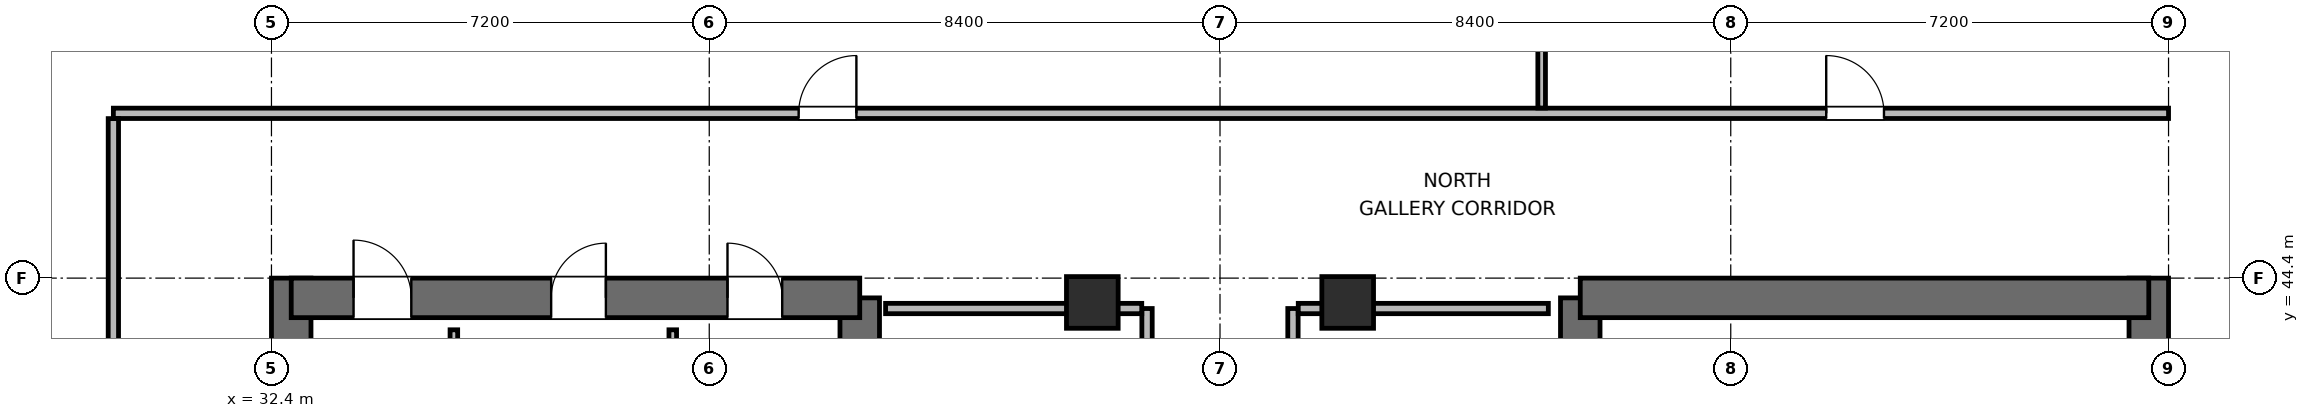
"""IFC4 building model, lengths in metres.
Left out: names, types, materials, properties, quantities, classifications, styles, units other than length and angle.
Written with IfcOpenShell. Run it as: python <this file> out.ifc"""

import sys

from ifc_helpers import new_model, si_unit, direction, frame, frame_2d, origin, origin_2d, place, context, subcontext, project, spatial, rectangle, extrude, element, fill, save


model = new_model("IFC4")
c1 = context("Model", 3, precision=1e-05, world=origin(), true_north=direction((0.0, 1.0)))
c2 = subcontext(c1, "Body", "Model", "MODEL_VIEW")
j1 = project(units=[si_unit("LENGTHUNIT", "METRE"), si_unit("PLANEANGLEUNIT", "RADIAN")], contexts=[c1])
p1 = place(None, origin())
s1 = spatial("IfcSite", under=j1, at=p1, CompositionType="ELEMENT")
p2 = place(p1, origin())
s2 = spatial("IfcBuilding", under=s1, at=p2, CompositionType="ELEMENT")
p3 = place(p2, frame((0.0, 0.0, 214.8)))
s3 = spatial("IfcBuildingStorey", under=s2, at=p3, CompositionType="ELEMENT", Elevation=214.8)
p4 = place(p3, frame((32.725, 27.6, 0.0), z_axis=(0.0, 0.0, 1.0), x_axis=(0.0, 1.0, 0.0)))
e1 = element("IfcWall", 1, at=p4, inside=s3, PredefinedType="SHEAR", context=c2, shape_type="SweptSolid", body=[
    extrude(rectangle(XDim=16.8, YDim=0.65, at=frame_2d((8.4, 0.0))), origin(), (0.0, 0.0, 1.0), 4.5),
])
p5 = place(p3, frame((42.075, 37.8, 0.0), z_axis=(0.0, 0.0, 1.0), x_axis=(0.0, 1.0, 0.0)))
e2 = element("IfcWall", 2, at=p5, inside=s3, PredefinedType="SHEAR", context=c2, shape_type="SweptSolid", body=[
    extrude(rectangle(XDim=6.275, YDim=0.65, at=frame_2d((3.137, 0.0))), origin(), (0.0, 0.0, 1.0), 4.5),
])
p6 = place(p3, frame((32.725, 44.075, 0.0), z_axis=(0.0, 0.0, 1.0), x_axis=(1.0, 0.0, 0.0)))
e3 = element("IfcWall", 3, at=p6, inside=s3, PredefinedType="SHEAR", context=c2, shape_type="SweptSolid", body=[
    extrude(rectangle(XDim=9.35, YDim=0.65, at=frame_2d((4.675, 0.0))), origin(), (0.0, 0.0, 1.0), 4.5),
])
p7 = place(p6, frame((1.025, 0.0, 0.0)))
e4 = element("IfcOpeningElement", 4, at=p7, cuts=e3, PredefinedType="OPENING", context=c2, shape_type="SweptSolid", body=[
    extrude(rectangle(XDim=0.95, YDim=2.04, at=frame_2d((0.475, 1.02))), frame((0.0, 0.335, 0.0), z_axis=(0.0, -1.0, 0.0), x_axis=(1.0, 0.0, 0.0)), (0.0, 0.0, 1.0), 0.67),
])
p8 = place(p6, frame((4.275, 0.0, 0.0)))
e5 = element("IfcOpeningElement", 5, at=p8, cuts=e3, PredefinedType="OPENING", context=c2, shape_type="SweptSolid", body=[
    extrude(rectangle(XDim=0.9, YDim=2.02, at=frame_2d((0.45, 1.01))), frame((0.0, 0.335, 0.0), z_axis=(0.0, -1.0, 0.0), x_axis=(1.0, 0.0, 0.0)), (0.0, 0.0, 1.0), 0.67),
])
p9 = place(p6, frame((7.175, 0.0, 0.0)))
e6 = element("IfcOpeningElement", 6, at=p9, cuts=e3, PredefinedType="OPENING", context=c2, shape_type="SweptSolid", body=[
    extrude(rectangle(XDim=0.9, YDim=2.02, at=frame_2d((0.45, 1.01))), frame((0.0, 0.335, 0.0), z_axis=(0.0, -1.0, 0.0), x_axis=(1.0, 0.0, 0.0)), (0.0, 0.0, 1.0), 0.67),
])
p10 = place(p3, frame((53.925, 38.0, 0.0), z_axis=(0.0, 0.0, 1.0), x_axis=(0.0, 1.0, 0.0)))
e7 = element("IfcWall", 7, at=p10, inside=s3, PredefinedType="SHEAR", context=c2, shape_type="SweptSolid", body=[
    extrude(rectangle(XDim=6.075, YDim=0.65, at=frame_2d((3.038, 0.0))), origin(), (0.0, 0.0, 1.0), 4.5),
])
p11 = place(p3, frame((63.275, 27.6, 0.0), z_axis=(0.0, 0.0, 1.0), x_axis=(0.0, 1.0, 0.0)))
e8 = element("IfcWall", 8, at=p11, inside=s3, PredefinedType="SHEAR", context=c2, shape_type="SweptSolid", body=[
    extrude(rectangle(XDim=16.8, YDim=0.65, at=frame_2d((8.4, 0.0))), origin(), (0.0, 0.0, 1.0), 4.5),
])
p12 = place(p3, frame((53.925, 44.075, 0.0), z_axis=(0.0, 0.0, 1.0), x_axis=(1.0, 0.0, 0.0)))
e9 = element("IfcWall", 9, at=p12, inside=s3, PredefinedType="SHEAR", context=c2, shape_type="SweptSolid", body=[
    extrude(rectangle(XDim=9.35, YDim=0.65, at=frame_2d((4.675, 0.0))), origin(), (0.0, 0.0, 1.0), 4.5),
])
for number, where, z_axis, x_axis in (
    (10, (45.9, 44.0, 0.0), (0.0, 0.0, 1.0), (1.0, 0.0, 0.0)),
    (11, (50.1, 44.0, 0.0), (0.0, 0.0, 1.0), (1.0, 0.0, 0.0)),
):
    element("IfcColumn", number, at=place(p3, frame(where, z_axis=z_axis, x_axis=x_axis)), inside=s3, PredefinedType="COLUMN", context=c2, shape_type="SweptSolid", body=[
        extrude(rectangle(XDim=0.85, YDim=0.85, at=origin_2d()), origin(), (0.0, 0.0, 1.0), 4.5),
    ])
for number, where, z_axis, x_axis in (
    (12, (35.4, 41.095, 0.0), (0.0, 0.0, 1.0), (0.0, 1.0, 0.0)),
    (13, (39.0, 41.095, 0.0), (0.0, 0.0, 1.0), (0.0, 1.0, 0.0)),
):
    element("IfcWall", number, at=place(p3, frame(where, z_axis=z_axis, x_axis=x_axis)), inside=s3, PredefinedType="PARTITIONING", context=c2, shape_type="SweptSolid", body=[
        extrude(rectangle(XDim=2.455, YDim=0.125, at=frame_2d((1.228, 0.0))), origin(), (0.0, 0.0, 1.0), 4.28),
    ])
p13 = place(p3, frame((46.8, 37.9, 0.0), z_axis=(0.0, 0.0, 1.0), x_axis=(0.0, 1.0, 0.0)))
e14 = element("IfcWall", 14, at=p13, inside=s3, PredefinedType="PARTITIONING", context=c2, shape_type="SweptSolid", body=[
    extrude(rectangle(XDim=6.0, YDim=0.17, at=frame_2d((3.0, 0.0))), origin(), (0.0, 0.0, 1.0), 4.28),
])
p14 = place(p13, frame((1.47, 0.0, 0.0)))
e15 = element("IfcOpeningElement", 15, at=p14, cuts=e14, PredefinedType="OPENING", context=c2, shape_type="SweptSolid", body=[
    extrude(rectangle(XDim=0.9, YDim=2.02, at=frame_2d((0.45, 1.01))), frame((0.0, 0.095, 0.0), z_axis=(0.0, -1.0, 0.0), x_axis=(1.0, 0.0, 0.0)), (0.0, 0.0, 1.0), 0.19),
])
p15 = place(p13, frame((4.47, 0.0, 0.0)))
e16 = element("IfcOpeningElement", 16, at=p15, cuts=e14, PredefinedType="OPENING", context=c2, shape_type="SweptSolid", body=[
    extrude(rectangle(XDim=0.9, YDim=2.02, at=frame_2d((0.45, 1.01))), frame((0.0, 0.095, 0.0), z_axis=(0.0, -1.0, 0.0), x_axis=(1.0, 0.0, 0.0)), (0.0, 0.0, 1.0), 0.19),
])
p16 = place(p3, frame((42.5, 43.9, 0.0), z_axis=(0.0, 0.0, 1.0), x_axis=(1.0, 0.0, 0.0)))
e17 = element("IfcWall", 17, at=p16, inside=s3, PredefinedType="PARTITIONING", context=c2, shape_type="SweptSolid", body=[
    extrude(rectangle(XDim=4.213, YDim=0.17, at=frame_2d((2.106, 0.0))), origin(), (0.0, 0.0, 1.0), 3.365),
])
p17 = place(p3, frame((49.2, 37.9, 0.0), z_axis=(0.0, 0.0, 1.0), x_axis=(0.0, 1.0, 0.0)))
e18 = element("IfcWall", 18, at=p17, inside=s3, PredefinedType="PARTITIONING", context=c2, shape_type="SweptSolid", body=[
    extrude(rectangle(XDim=6.0, YDim=0.17, at=frame_2d((3.0, 0.0))), origin(), (0.0, 0.0, 1.0), 4.28),
])
p18 = place(p17, frame((2.55, 0.0, 0.0)))
e19 = element("IfcOpeningElement", 19, at=p18, cuts=e18, PredefinedType="OPENING", context=c2, shape_type="SweptSolid", body=[
    extrude(rectangle(XDim=0.9, YDim=2.02, at=frame_2d((0.45, 1.01))), frame((0.0, 0.095, 0.0), z_axis=(0.0, -1.0, 0.0), x_axis=(1.0, 0.0, 0.0)), (0.0, 0.0, 1.0), 0.19),
])
p19 = place(p3, frame((49.287, 43.9, 0.0), z_axis=(0.0, 0.0, 1.0), x_axis=(1.0, 0.0, 0.0)))
e20 = element("IfcWall", 20, at=p19, inside=s3, PredefinedType="PARTITIONING", context=c2, shape_type="SweptSolid", body=[
    extrude(rectangle(XDim=4.113, YDim=0.17, at=frame_2d((2.056, 0.0))), origin(), (0.0, 0.0, 1.0), 3.365),
])
p20 = place(p3, frame((29.8, 47.11, 0.0), z_axis=(0.0, 0.0, 1.0), x_axis=(1.0, 0.0, 0.0)))
e21 = element("IfcWall", 21, at=p20, inside=s3, PredefinedType="PARTITIONING", context=c2, shape_type="SweptSolid", body=[
    extrude(rectangle(XDim=33.8, YDim=0.17, at=frame_2d((16.9, 0.0))), origin(), (0.0, 0.0, 1.0), 4.28),
])
p21 = place(p20, frame((11.27, 0.0, 0.0)))
e22 = element("IfcOpeningElement", 22, at=p21, cuts=e21, PredefinedType="OPENING", context=c2, shape_type="SweptSolid", body=[
    extrude(rectangle(XDim=0.95, YDim=2.04, at=frame_2d((0.475, 1.02))), frame((0.0, 0.095, 0.0), z_axis=(0.0, -1.0, 0.0), x_axis=(1.0, 0.0, 0.0)), (0.0, 0.0, 1.0), 0.19),
])
p22 = place(p20, frame((28.17, 0.0, 0.0)))
e23 = element("IfcOpeningElement", 23, at=p22, cuts=e21, PredefinedType="OPENING", context=c2, shape_type="SweptSolid", body=[
    extrude(rectangle(XDim=0.95, YDim=2.04, at=frame_2d((0.475, 1.02))), frame((0.0, 0.095, 0.0), z_axis=(0.0, -1.0, 0.0), x_axis=(1.0, 0.0, 0.0)), (0.0, 0.0, 1.0), 0.19),
])
p23 = place(p3, frame((29.8, 24.977, 0.0), z_axis=(0.0, 0.0, 1.0), x_axis=(0.0, 1.0, 0.0)))
e24 = element("IfcWall", 24, at=p23, inside=s3, PredefinedType="PARTITIONING", context=c2, shape_type="SweptSolid", body=[
    extrude(rectangle(XDim=22.046, YDim=0.17, at=frame_2d((11.023, 0.0))), origin(), (0.0, 0.0, 1.0), 4.28),
])
p24 = place(p23, frame((4.593, 0.0, 0.0)))
e25 = element("IfcOpeningElement", 25, at=p24, cuts=e24, PredefinedType="OPENING", context=c2, shape_type="SweptSolid", body=[
    extrude(rectangle(XDim=0.95, YDim=2.04, at=frame_2d((0.475, 1.02))), frame((0.0, 0.095, 0.0), z_axis=(0.0, -1.0, 0.0), x_axis=(1.0, 0.0, 0.0)), (0.0, 0.0, 1.0), 0.19),
])
p25 = place(p23, frame((15.703, 0.0, 0.0)))
e26 = element("IfcOpeningElement", 26, at=p25, cuts=e24, PredefinedType="OPENING", context=c2, shape_type="SweptSolid", body=[
    extrude(rectangle(XDim=0.95, YDim=2.04, at=frame_2d((0.475, 1.02))), frame((0.0, 0.095, 0.0), z_axis=(0.0, -1.0, 0.0), x_axis=(1.0, 0.0, 0.0)), (0.0, 0.0, 1.0), 0.19),
])
p26 = place(p3, frame((53.29, 47.197, 0.0), z_axis=(0.0, 0.0, 1.0), x_axis=(0.0, 1.0, 0.0)))
e27 = element("IfcWall", 27, at=p26, inside=s3, PredefinedType="PARTITIONING", context=c2, shape_type="SweptSolid", body=[
    extrude(rectangle(XDim=11.448, YDim=0.125, at=frame_2d((5.724, 0.0))), origin(), (0.0, 0.0, 1.0), 3.643),
])
p27 = place(p7, origin())
e28 = element("IfcDoor", 28, at=p27, inside=s3, OperationType="SINGLE_SWING_LEFT", PredefinedType="DOOR", context=c2, shape_type="SweptSolid", body=[
    extrude(rectangle(XDim=0.95, YDim=2.04, at=frame_2d((0.475, 1.02))), frame((0.0, 0.025, 0.0), z_axis=(0.0, -1.0, 0.0), x_axis=(1.0, 0.0, 0.0)), (0.0, 0.0, 1.0), 0.05),
])
fill(e4, e28)
p28 = place(p8, origin())
e29 = element("IfcDoor", 29, at=p28, inside=s3, OperationType="SINGLE_SWING_RIGHT", PredefinedType="DOOR", context=c2, shape_type="SweptSolid", body=[
    extrude(rectangle(XDim=0.9, YDim=2.02, at=frame_2d((0.45, 1.01))), frame((0.0, 0.025, 0.0), z_axis=(0.0, -1.0, 0.0), x_axis=(1.0, 0.0, 0.0)), (0.0, 0.0, 1.0), 0.05),
])
fill(e5, e29)
p29 = place(p9, origin())
e30 = element("IfcDoor", 30, at=p29, inside=s3, OperationType="SINGLE_SWING_LEFT", PredefinedType="DOOR", context=c2, shape_type="SweptSolid", body=[
    extrude(rectangle(XDim=0.9, YDim=2.02, at=frame_2d((0.45, 1.01))), frame((0.0, 0.025, 0.0), z_axis=(0.0, -1.0, 0.0), x_axis=(1.0, 0.0, 0.0)), (0.0, 0.0, 1.0), 0.05),
])
fill(e6, e30)
p30 = place(p21, origin())
e31 = element("IfcDoor", 31, at=p30, inside=s3, OperationType="SINGLE_SWING_RIGHT", PredefinedType="DOOR", context=c2, shape_type="SweptSolid", body=[
    extrude(rectangle(XDim=0.95, YDim=2.04, at=frame_2d((0.475, 1.02))), frame((0.0, 0.025, 0.0), z_axis=(0.0, -1.0, 0.0), x_axis=(1.0, 0.0, 0.0)), (0.0, 0.0, 1.0), 0.05),
])
fill(e22, e31)
p31 = place(p22, origin())
e32 = element("IfcDoor", 32, at=p31, inside=s3, OperationType="SINGLE_SWING_LEFT", PredefinedType="DOOR", context=c2, shape_type="SweptSolid", body=[
    extrude(rectangle(XDim=0.95, YDim=2.04, at=frame_2d((0.475, 1.02))), frame((0.0, 0.025, 0.0), z_axis=(0.0, -1.0, 0.0), x_axis=(1.0, 0.0, 0.0)), (0.0, 0.0, 1.0), 0.05),
])
fill(e23, e32)
save(model, sys.argv[1])
